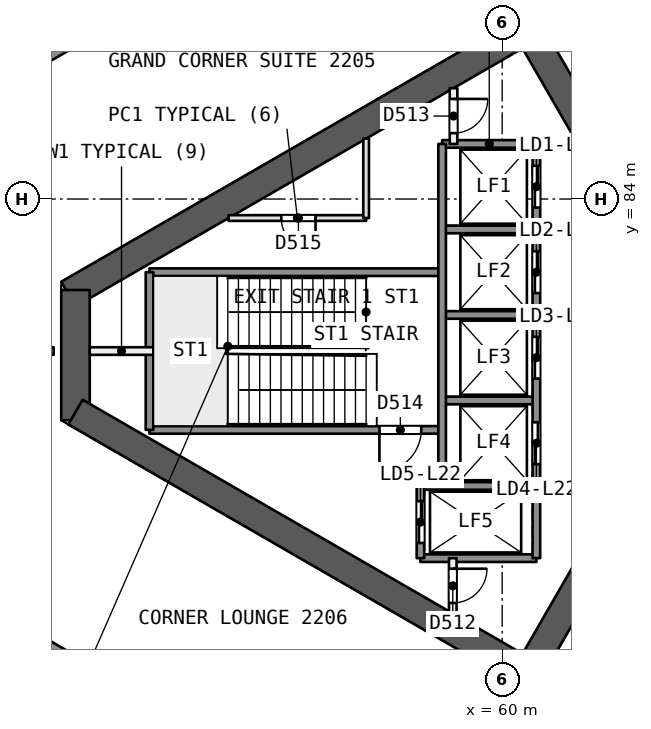
"""IFC4 building model, lengths in metres.
Left out: names, types, materials, properties, quantities, classifications, styles, units other than length and angle.
Written with IfcOpenShell. Run it as: python <this file> out.ifc"""

import sys

from ifc_helpers import new_model, si_unit, direction, frame, frame_2d, origin, place, context, subcontext, project, spatial, rectangle, extrude, element, fill, save


model = new_model("IFC4")
c1 = context("Model", 3, precision=1e-05, world=origin(), true_north=direction((0.0, 1.0)))
c2 = subcontext(c1, "Body", "Model", "MODEL_VIEW")
j1 = project(units=[si_unit("LENGTHUNIT", "METRE"), si_unit("PLANEANGLEUNIT", "RADIAN")], contexts=[c1])
p1 = place(None, origin())
s1 = spatial("IfcSite", under=j1, at=p1, CompositionType="ELEMENT")
p2 = place(p1, origin())
s2 = spatial("IfcBuilding", under=s1, at=p2, CompositionType="ELEMENT")
p3 = place(p2, frame((0.0, 0.0, 94.3)))
s3 = spatial("IfcBuildingStorey", under=s2, at=p3, CompositionType="ELEMENT", Elevation=94.3)
p4 = place(p3, frame((65.567, 80.0, 0.0), z_axis=(0.0, 0.0, 1.0), x_axis=(-0.499988615364, 0.866031976607, 0.0)))
e1 = element("IfcWall", 1, at=p4, inside=s3, PredefinedType="SHEAR", context=c2, shape_type="SweptSolid", body=[
    extrude(rectangle(XDim=10.163, YDim=0.75, at=frame_2d((5.082, 0.0))), origin(), (0.0, 0.0, 1.0), 3.7),
])
p5 = place(p4, frame((0.733, 0.0, 0.0)))
e2 = element("IfcOpeningElement", 2, at=p5, cuts=e1, PredefinedType="OPENING", context=c2, shape_type="SweptSolid", body=[
    extrude(rectangle(XDim=1.2, YDim=2.1, at=frame_2d((0.6, 1.05))), frame((0.0, 0.385, 0.0), z_axis=(0.0, -1.0, 0.0), x_axis=(1.0, 0.0, 0.0)), (0.0, 0.0, 1.0), 0.771),
])
p6 = place(p3, frame((60.673, 88.477, 0.0), z_axis=(0.0, 0.0, 1.0), x_axis=(-0.8660248072, -0.500001033313, 0.0)))
e3 = element("IfcWall", 3, at=p6, inside=s3, PredefinedType="SHEAR", context=c2, shape_type="SweptSolid", body=[
    extrude(rectangle(XDim=13.958, YDim=0.75, at=frame_2d((6.979, 0.0))), origin(), (0.0, 0.0, 1.0), 3.7),
])
p7 = place(p3, frame((48.772, 81.606, 0.0), z_axis=(0.0, 0.0, 1.0), x_axis=(0.0, -1.0, 0.0)))
e4 = element("IfcWall", 4, at=p7, inside=s3, PredefinedType="SHEAR", context=c2, shape_type="SweptSolid", body=[
    extrude(rectangle(XDim=3.429, YDim=0.75, at=frame_2d((1.714, 0.0))), origin(), (0.0, 0.0, 1.0), 3.7),
])
p8 = place(p3, frame((48.772, 78.394, 0.0), z_axis=(0.0, 0.0, 1.0), x_axis=(0.866028339916, -0.499994914436, 0.0)))
e5 = element("IfcWall", 5, at=p8, inside=s3, PredefinedType="SHEAR", context=c2, shape_type="SweptSolid", body=[
    extrude(rectangle(XDim=14.117, YDim=0.75, at=frame_2d((7.059, 0.0))), origin(), (0.0, 0.0, 1.0), 3.7),
])
p9 = place(p3, frame((60.673, 71.523, 0.0), z_axis=(0.0, 0.0, 1.0), x_axis=(0.499997052475, 0.866027105532, 0.0)))
e6 = element("IfcWall", 6, at=p9, inside=s3, PredefinedType="SHEAR", context=c2, shape_type="SweptSolid", body=[
    extrude(rectangle(XDim=10.005, YDim=0.75, at=frame_2d((5.002, 0.0))), origin(), (0.0, 0.0, 1.0), 3.7),
])
p10 = place(p9, frame((7.855, 0.0, 0.0)))
e7 = element("IfcOpeningElement", 7, at=p10, cuts=e6, PredefinedType="OPENING", context=c2, shape_type="SweptSolid", body=[
    extrude(rectangle(XDim=1.2, YDim=2.1, at=frame_2d((0.6, 1.05))), frame((0.0, 0.385, 0.0), z_axis=(0.0, -1.0, 0.0), x_axis=(1.0, 0.0, 0.0)), (0.0, 0.0, 1.0), 0.771),
])
p11 = place(p3, frame((39.893, 80.001, 0.0), z_axis=(0.0, 0.0, 1.0), x_axis=(1.0, 0.0, 0.0)))
e8 = element("IfcWall", 8, at=p11, inside=s3, PredefinedType="PARTITIONING", context=c2, shape_type="SweptSolid", body=[
    extrude(rectangle(XDim=8.305, YDim=0.2, at=frame_2d((4.152, 0.0))), origin(), (0.0, 0.0, 1.0), 3.25),
])
p12 = place(p3, frame((39.744, 82.972, 0.0), z_axis=(0.0, 0.0, 1.0), x_axis=(0.866025390357, 0.500000023256, 0.0)))
e9 = element("IfcWall", 9, at=p12, inside=s3, PredefinedType="SOLIDWALL", context=c2, shape_type="SweptSolid", body=[
    extrude(rectangle(XDim=58.093, YDim=0.3, at=frame_2d((29.046, 0.0))), origin(), (0.0, 0.0, 1.0), 3.25),
])
p13 = place(p12, frame((43.192, 0.0, 0.0)))
e10 = element("IfcOpeningElement", 10, at=p13, cuts=e9, PredefinedType="OPENING", context=c2, shape_type="SweptSolid", body=[
    extrude(rectangle(XDim=2.4, YDim=2.4, at=frame_2d((1.2, 1.2))), frame((0.0, 0.161, 0.0), z_axis=(0.0, -1.0, 0.0), x_axis=(1.0, 0.0, 0.0)), (0.0, 0.0, 1.0), 0.321),
])
p14 = place(p12, frame((12.5, 0.0, 0.0)))
e11 = element("IfcOpeningElement", 11, at=p14, cuts=e9, PredefinedType="OPENING", context=c2, shape_type="SweptSolid", body=[
    extrude(rectangle(XDim=2.4, YDim=2.4, at=frame_2d((1.2, 1.2))), frame((0.0, 0.161, 0.0), z_axis=(0.0, -1.0, 0.0), x_axis=(1.0, 0.0, 0.0)), (0.0, 0.0, 1.0), 0.321),
])
p15 = place(p12, frame((27.846, 0.0, 0.0)))
e12 = element("IfcOpeningElement", 12, at=p15, cuts=e9, PredefinedType="OPENING", context=c2, shape_type="SweptSolid", body=[
    extrude(rectangle(XDim=2.4, YDim=2.4, at=frame_2d((1.2, 1.2))), frame((0.0, 0.161, 0.0), z_axis=(0.0, -1.0, 0.0), x_axis=(1.0, 0.0, 0.0)), (0.0, 0.0, 1.0), 0.321),
])
p16 = place(p3, frame((90.054, 47.981, 0.0), z_axis=(0.0, 0.0, 1.0), x_axis=(-0.866025390357, 0.500000023256, 0.0)))
e13 = element("IfcWall", 13, at=p16, inside=s3, PredefinedType="SOLIDWALL", context=c2, shape_type="SweptSolid", body=[
    extrude(rectangle(XDim=58.093, YDim=0.3, at=frame_2d((29.046, 0.0))), origin(), (0.0, 0.0, 1.0), 3.25),
])
p17 = place(p16, frame((43.972, 0.0, 0.0)))
e14 = element("IfcOpeningElement", 14, at=p17, cuts=e13, PredefinedType="OPENING", context=c2, shape_type="SweptSolid", body=[
    extrude(rectangle(XDim=2.4, YDim=2.4, at=frame_2d((1.2, 1.2))), frame((0.0, 0.161, 0.0), z_axis=(0.0, -1.0, 0.0), x_axis=(1.0, 0.0, 0.0)), (0.0, 0.0, 1.0), 0.321),
])
p18 = place(p16, frame((22.39, 0.0, 0.0)))
e15 = element("IfcOpeningElement", 15, at=p18, cuts=e13, PredefinedType="OPENING", context=c2, shape_type="SweptSolid", body=[
    extrude(rectangle(XDim=2.4, YDim=2.4, at=frame_2d((1.2, 1.2))), frame((0.0, 0.161, 0.0), z_axis=(0.0, -1.0, 0.0), x_axis=(1.0, 0.0, 0.0)), (0.0, 0.0, 1.0), 0.321),
])
p19 = place(p16, frame((10.643, 0.0, 0.0)))
e16 = element("IfcOpeningElement", 16, at=p19, cuts=e13, PredefinedType="OPENING", context=c2, shape_type="SweptSolid", body=[
    extrude(rectangle(XDim=2.4, YDim=2.4, at=frame_2d((1.2, 1.2))), frame((0.0, 0.161, 0.0), z_axis=(0.0, -1.0, 0.0), x_axis=(1.0, 0.0, 0.0)), (0.0, 0.0, 1.0), 0.321),
])
p20 = place(p16, frame((29.705, 0.0, 0.9)))
e17 = element("IfcOpeningElement", 17, at=p20, cuts=e13, PredefinedType="OPENING", context=c2, shape_type="SweptSolid", body=[
    extrude(rectangle(XDim=1.8, YDim=1.5, at=frame_2d((0.9, 0.75))), frame((0.0, 0.161, 0.0), z_axis=(0.0, -1.0, 0.0), x_axis=(1.0, 0.0, 0.0)), (0.0, 0.0, 1.0), 0.321),
])
p21 = place(p16, frame((26.587, 0.0, 0.9)))
e18 = element("IfcOpeningElement", 18, at=p21, cuts=e13, PredefinedType="OPENING", context=c2, shape_type="SweptSolid", body=[
    extrude(rectangle(XDim=1.8, YDim=1.5, at=frame_2d((0.9, 0.75))), frame((0.0, 0.161, 0.0), z_axis=(0.0, -1.0, 0.0), x_axis=(1.0, 0.0, 0.0)), (0.0, 0.0, 1.0), 0.321),
])
p22 = place(p3, frame((60.9, 85.45, 0.0), z_axis=(0.0, 0.0, 1.0), x_axis=(-1.0, 0.0, 0.0)))
e19 = element("IfcWall", 19, at=p22, inside=s3, PredefinedType="SOLIDWALL", context=c2, shape_type="SweptSolid", body=[
    extrude(rectangle(XDim=2.48, YDim=0.2, at=frame_2d((1.24, 0.0))), origin(), (0.0, 0.0, 1.0), 3.25),
])
p23 = place(p3, frame((56.42, 83.5, 0.0), z_axis=(0.0, 0.0, 1.0), x_axis=(-1.0, 0.0, 0.0)))
e20 = element("IfcWall", 20, at=p23, inside=s3, PredefinedType="PARTITIONING", context=c2, shape_type="SweptSolid", body=[
    extrude(rectangle(XDim=3.618, YDim=0.15, at=frame_2d((1.809, 0.0))), origin(), (0.0, 0.0, 1.0), 3.25),
])
p24 = place(p23, frame((1.332, 0.0, 0.0)))
e21 = element("IfcOpeningElement", 21, at=p24, cuts=e20, PredefinedType="OPENING", context=c2, shape_type="SweptSolid", body=[
    extrude(rectangle(XDim=0.9, YDim=2.1, at=frame_2d((0.45, 1.05))), frame((0.0, 0.085, 0.0), z_axis=(0.0, -1.0, 0.0), x_axis=(1.0, 0.0, 0.0)), (0.0, 0.0, 1.0), 0.171),
])
p25 = place(p3, frame((60.9, 83.2, 0.0), z_axis=(0.0, 0.0, 1.0), x_axis=(-1.0, 0.0, 0.0)))
e22 = element("IfcWall", 22, at=p25, inside=s3, PredefinedType="SOLIDWALL", context=c2, shape_type="SweptSolid", body=[
    extrude(rectangle(XDim=2.48, YDim=0.2, at=frame_2d((1.24, 0.0))), origin(), (0.0, 0.0, 1.0), 3.25),
])
p26 = place(p3, frame((58.42, 82.075, 0.0), z_axis=(0.0, 0.0, 1.0), x_axis=(-1.0, 0.0, 0.0)))
e23 = element("IfcWall", 23, at=p26, inside=s3, PredefinedType="SOLIDWALL", context=c2, shape_type="SweptSolid", body=[
    extrude(rectangle(XDim=7.7, YDim=0.2, at=frame_2d((3.85, 0.0))), origin(), (0.0, 0.0, 1.0), 3.25),
])
p27 = place(p3, frame((60.9, 80.95, 0.0), z_axis=(0.0, 0.0, 1.0), x_axis=(-1.0, 0.0, 0.0)))
e24 = element("IfcWall", 24, at=p27, inside=s3, PredefinedType="SOLIDWALL", context=c2, shape_type="SweptSolid", body=[
    extrude(rectangle(XDim=2.48, YDim=0.2, at=frame_2d((1.24, 0.0))), origin(), (0.0, 0.0, 1.0), 3.25),
])
p28 = place(p3, frame((50.82, 80.0, 0.0), z_axis=(0.0, 0.0, 1.0), x_axis=(-1.0, 0.0, 0.0)))
e25 = element("IfcWall", 25, at=p28, inside=s3, PredefinedType="PARTITIONING", context=c2, shape_type="SweptSolid", body=[
    extrude(rectangle(XDim=1.673, YDim=0.2, at=frame_2d((0.836, 0.0))), origin(), (0.0, 0.0, 1.0), 3.25),
])
p29 = place(p3, frame((60.9, 78.7, 0.0), z_axis=(0.0, 0.0, 1.0), x_axis=(-1.0, 0.0, 0.0)))
e26 = element("IfcWall", 26, at=p29, inside=s3, PredefinedType="SOLIDWALL", context=c2, shape_type="SweptSolid", body=[
    extrude(rectangle(XDim=2.48, YDim=0.2, at=frame_2d((1.24, 0.0))), origin(), (0.0, 0.0, 1.0), 3.25),
])
p30 = place(p3, frame((58.42, 77.925, 0.0), z_axis=(0.0, 0.0, 1.0), x_axis=(-1.0, 0.0, 0.0)))
e27 = element("IfcWall", 27, at=p30, inside=s3, PredefinedType="SOLIDWALL", context=c2, shape_type="SweptSolid", body=[
    extrude(rectangle(XDim=7.7, YDim=0.2, at=frame_2d((3.85, 0.0))), origin(), (0.0, 0.0, 1.0), 3.25),
])
p31 = place(p30, frame((0.55, 0.0, 0.0)))
e28 = element("IfcOpeningElement", 28, at=p31, cuts=e27, PredefinedType="OPENING", context=c2, shape_type="SweptSolid", body=[
    extrude(rectangle(XDim=1.1, YDim=2.1, at=frame_2d((0.55, 1.05))), frame((0.0, 0.11, 0.0), z_axis=(0.0, -1.0, 0.0), x_axis=(1.0, 0.0, 0.0)), (0.0, 0.0, 1.0), 0.221),
])
for number, where, z_axis, x_axis in (
    (29, (60.9, 76.45, 0.0), (0.0, 0.0, 1.0), (-1.0, 0.0, 0.0)),
    (30, (60.9, 74.55, 0.0), (0.0, 0.0, 1.0), (-1.0, 0.0, 0.0)),
):
    element("IfcWall", number, at=place(p3, frame(where, z_axis=z_axis, x_axis=x_axis)), inside=s3, PredefinedType="SOLIDWALL", context=c2, shape_type="SweptSolid", body=[
        extrude(rectangle(XDim=3.05, YDim=0.2, at=frame_2d((1.525, 0.0))), origin(), (0.0, 0.0, 1.0), 3.25),
    ])
p32 = place(p3, frame((60.9, 85.45, 0.0), z_axis=(0.0, 0.0, 1.0), x_axis=(0.0, -1.0, 0.0)))
e31 = element("IfcWall", 31, at=p32, inside=s3, PredefinedType="SOLIDWALL", context=c2, shape_type="SweptSolid", body=[
    extrude(rectangle(XDim=10.9, YDim=0.2, at=frame_2d((5.45, 0.0))), origin(), (0.0, 0.0, 1.0), 3.25),
])
p33 = place(p32, frame((0.575, 0.0, 0.0)))
e32 = element("IfcOpeningElement", 32, at=p33, cuts=e31, PredefinedType="OPENING", context=c2, shape_type="SweptSolid", body=[
    extrude(rectangle(XDim=1.1, YDim=2.1, at=frame_2d((0.55, 1.05))), frame((0.0, 0.11, 0.0), z_axis=(0.0, -1.0, 0.0), x_axis=(1.0, 0.0, 0.0)), (0.0, 0.0, 1.0), 0.221),
])
p34 = place(p32, frame((2.825, 0.0, 0.0)))
e33 = element("IfcOpeningElement", 33, at=p34, cuts=e31, PredefinedType="OPENING", context=c2, shape_type="SweptSolid", body=[
    extrude(rectangle(XDim=1.1, YDim=2.1, at=frame_2d((0.55, 1.05))), frame((0.0, 0.11, 0.0), z_axis=(0.0, -1.0, 0.0), x_axis=(1.0, 0.0, 0.0)), (0.0, 0.0, 1.0), 0.221),
])
p35 = place(p32, frame((5.075, 0.0, 0.0)))
e34 = element("IfcOpeningElement", 34, at=p35, cuts=e31, PredefinedType="OPENING", context=c2, shape_type="SweptSolid", body=[
    extrude(rectangle(XDim=1.1, YDim=2.1, at=frame_2d((0.55, 1.05))), frame((0.0, 0.11, 0.0), z_axis=(0.0, -1.0, 0.0), x_axis=(1.0, 0.0, 0.0)), (0.0, 0.0, 1.0), 0.221),
])
p36 = place(p32, frame((7.325, 0.0, 0.0)))
e35 = element("IfcOpeningElement", 35, at=p36, cuts=e31, PredefinedType="OPENING", context=c2, shape_type="SweptSolid", body=[
    extrude(rectangle(XDim=1.1, YDim=2.1, at=frame_2d((0.55, 1.05))), frame((0.0, 0.11, 0.0), z_axis=(0.0, -1.0, 0.0), x_axis=(1.0, 0.0, 0.0)), (0.0, 0.0, 1.0), 0.221),
])
p37 = place(p3, frame((58.72, 86.917, 0.0), z_axis=(0.0, 0.0, 1.0), x_axis=(0.0, -1.0, 0.0)))
e36 = element("IfcWall", 36, at=p37, inside=s3, PredefinedType="PARTITIONING", context=c2, shape_type="SweptSolid", body=[
    extrude(rectangle(XDim=1.467, YDim=0.2, at=frame_2d((0.733, 0.0))), origin(), (0.0, 0.0, 1.0), 3.25),
])
p38 = place(p37, frame((0.283, 0.0, 0.0)))
e37 = element("IfcOpeningElement", 37, at=p38, cuts=e36, PredefinedType="OPENING", context=c2, shape_type="SweptSolid", body=[
    extrude(rectangle(XDim=0.9, YDim=2.1, at=frame_2d((0.45, 1.05))), frame((0.0, 0.11, 0.0), z_axis=(0.0, -1.0, 0.0), x_axis=(1.0, 0.0, 0.0)), (0.0, 0.0, 1.0), 0.221),
])
p39 = place(p3, frame((58.7, 74.55, 0.0), z_axis=(0.0, 0.0, 1.0), x_axis=(0.0, -1.0, 0.0)))
e38 = element("IfcWall", 38, at=p39, inside=s3, PredefinedType="PARTITIONING", context=c2, shape_type="SweptSolid", body=[
    extrude(rectangle(XDim=1.455, YDim=0.2, at=frame_2d((0.728, 0.0))), origin(), (0.0, 0.0, 1.0), 3.25),
])
p40 = place(p39, frame((0.278, 0.0, 0.0)))
e39 = element("IfcOpeningElement", 39, at=p40, cuts=e38, PredefinedType="OPENING", context=c2, shape_type="SweptSolid", body=[
    extrude(rectangle(XDim=0.9, YDim=2.1, at=frame_2d((0.45, 1.05))), frame((0.0, 0.11, 0.0), z_axis=(0.0, -1.0, 0.0), x_axis=(1.0, 0.0, 0.0)), (0.0, 0.0, 1.0), 0.221),
])
p41 = place(p3, frame((58.42, 85.45, 0.0), z_axis=(0.0, 0.0, 1.0), x_axis=(0.0, -1.0, 0.0)))
e40 = element("IfcWall", 40, at=p41, inside=s3, PredefinedType="SOLIDWALL", context=c2, shape_type="SweptSolid", body=[
    extrude(rectangle(XDim=9.0, YDim=0.2, at=frame_2d((4.5, 0.0))), origin(), (0.0, 0.0, 1.0), 3.25),
])
p42 = place(p3, frame((57.85, 76.45, 0.0), z_axis=(0.0, 0.0, 1.0), x_axis=(0.0, -1.0, 0.0)))
e41 = element("IfcWall", 41, at=p42, inside=s3, PredefinedType="SOLIDWALL", context=c2, shape_type="SweptSolid", body=[
    extrude(rectangle(XDim=1.9, YDim=0.2, at=frame_2d((0.95, 0.0))), origin(), (0.0, 0.0, 1.0), 3.25),
])
p43 = place(p42, frame((0.4, 0.0, 0.0)))
e42 = element("IfcOpeningElement", 42, at=p43, cuts=e41, PredefinedType="OPENING", context=c2, shape_type="SweptSolid", body=[
    extrude(rectangle(XDim=1.1, YDim=2.1, at=frame_2d((0.55, 1.05))), frame((0.0, 0.11, 0.0), z_axis=(0.0, -1.0, 0.0), x_axis=(1.0, 0.0, 0.0)), (0.0, 0.0, 1.0), 0.221),
])
p44 = place(p3, frame((56.42, 85.589, 0.0), z_axis=(0.0, 0.0, 1.0), x_axis=(0.0, -1.0, 0.0)))
e43 = element("IfcWall", 43, at=p44, inside=s3, PredefinedType="PARTITIONING", context=c2, shape_type="SweptSolid", body=[
    extrude(rectangle(XDim=2.089, YDim=0.15, at=frame_2d((1.044, 0.0))), origin(), (0.0, 0.0, 1.0), 3.25),
])
p45 = place(p3, frame((50.72, 82.075, 0.0), z_axis=(0.0, 0.0, 1.0), x_axis=(0.0, -1.0, 0.0)))
e44 = element("IfcWall", 44, at=p45, inside=s3, PredefinedType="SOLIDWALL", context=c2, shape_type="SweptSolid", body=[
    extrude(rectangle(XDim=4.15, YDim=0.2, at=frame_2d((2.075, 0.0))), origin(), (0.0, 0.0, 1.0), 3.25),
])
p46 = place(p33, origin())
e45 = element("IfcDoor", 45, at=p46, inside=s3, OperationType="SLIDING_TO_RIGHT", PredefinedType="NOTDEFINED", context=c2, shape_type="SweptSolid", body=[
    extrude(rectangle(XDim=1.1, YDim=2.1, at=frame_2d((0.55, 1.05))), frame((0.0, 0.025, 0.0), z_axis=(0.0, -1.0, 0.0), x_axis=(1.0, 0.0, 0.0)), (0.0, 0.0, 1.0), 0.05),
])
fill(e32, e45)
p47 = place(p34, origin())
e46 = element("IfcDoor", 46, at=p47, inside=s3, OperationType="SLIDING_TO_LEFT", PredefinedType="NOTDEFINED", context=c2, shape_type="SweptSolid", body=[
    extrude(rectangle(XDim=1.1, YDim=2.1, at=frame_2d((0.55, 1.05))), frame((0.0, 0.025, 0.0), z_axis=(0.0, -1.0, 0.0), x_axis=(1.0, 0.0, 0.0)), (0.0, 0.0, 1.0), 0.05),
])
fill(e33, e46)
p48 = place(p35, origin())
e47 = element("IfcDoor", 47, at=p48, inside=s3, OperationType="SLIDING_TO_RIGHT", PredefinedType="NOTDEFINED", context=c2, shape_type="SweptSolid", body=[
    extrude(rectangle(XDim=1.1, YDim=2.1, at=frame_2d((0.55, 1.05))), frame((0.0, 0.025, 0.0), z_axis=(0.0, -1.0, 0.0), x_axis=(1.0, 0.0, 0.0)), (0.0, 0.0, 1.0), 0.05),
])
fill(e34, e47)
p49 = place(p36, origin())
e48 = element("IfcDoor", 48, at=p49, inside=s3, OperationType="SLIDING_TO_LEFT", PredefinedType="NOTDEFINED", context=c2, shape_type="SweptSolid", body=[
    extrude(rectangle(XDim=1.1, YDim=2.1, at=frame_2d((0.55, 1.05))), frame((0.0, 0.025, 0.0), z_axis=(0.0, -1.0, 0.0), x_axis=(1.0, 0.0, 0.0)), (0.0, 0.0, 1.0), 0.05),
])
fill(e35, e48)
p50 = place(p43, origin())
e49 = element("IfcDoor", 49, at=p50, inside=s3, OperationType="SLIDING_TO_RIGHT", PredefinedType="NOTDEFINED", context=c2, shape_type="SweptSolid", body=[
    extrude(rectangle(XDim=1.1, YDim=2.1, at=frame_2d((0.55, 1.05))), frame((0.0, 0.025, 0.0), z_axis=(0.0, -1.0, 0.0), x_axis=(1.0, 0.0, 0.0)), (0.0, 0.0, 1.0), 0.05),
])
fill(e42, e49)
p51 = place(p40, origin())
e50 = element("IfcDoor", 50, at=p51, inside=s3, OperationType="SINGLE_SWING_LEFT", PredefinedType="NOTDEFINED", context=c2, shape_type="SweptSolid", body=[
    extrude(rectangle(XDim=0.9, YDim=2.1, at=frame_2d((0.45, 1.05))), frame((0.0, 0.025, 0.0), z_axis=(0.0, -1.0, 0.0), x_axis=(1.0, 0.0, 0.0)), (0.0, 0.0, 1.0), 0.05),
])
fill(e39, e50)
p52 = place(p38, origin())
e51 = element("IfcDoor", 51, at=p52, inside=s3, OperationType="SINGLE_SWING_LEFT", PredefinedType="NOTDEFINED", context=c2, shape_type="SweptSolid", body=[
    extrude(rectangle(XDim=0.9, YDim=2.1, at=frame_2d((0.45, 1.05))), frame((0.0, 0.025, 0.0), z_axis=(0.0, -1.0, 0.0), x_axis=(1.0, 0.0, 0.0)), (0.0, 0.0, 1.0), 0.05),
])
fill(e37, e51)
p53 = place(p31, origin())
e52 = element("IfcDoor", 52, at=p53, inside=s3, OperationType="SINGLE_SWING_RIGHT", PredefinedType="NOTDEFINED", context=c2, shape_type="SweptSolid", body=[
    extrude(rectangle(XDim=1.1, YDim=2.1, at=frame_2d((0.55, 1.05))), frame((0.0, 0.025, 0.0), z_axis=(0.0, -1.0, 0.0), x_axis=(1.0, 0.0, 0.0)), (0.0, 0.0, 1.0), 0.05),
])
fill(e28, e52)
p54 = place(p24, origin())
e53 = element("IfcDoor", 53, at=p54, inside=s3, OperationType="SINGLE_SWING_LEFT", PredefinedType="NOTDEFINED", context=c2, shape_type="SweptSolid", body=[
    extrude(rectangle(XDim=0.9, YDim=2.1, at=frame_2d((0.45, 1.05))), frame((0.0, 0.025, 0.0), z_axis=(0.0, -1.0, 0.0), x_axis=(1.0, 0.0, 0.0)), (0.0, 0.0, 1.0), 0.05),
])
fill(e21, e53)
save(model, sys.argv[1])
